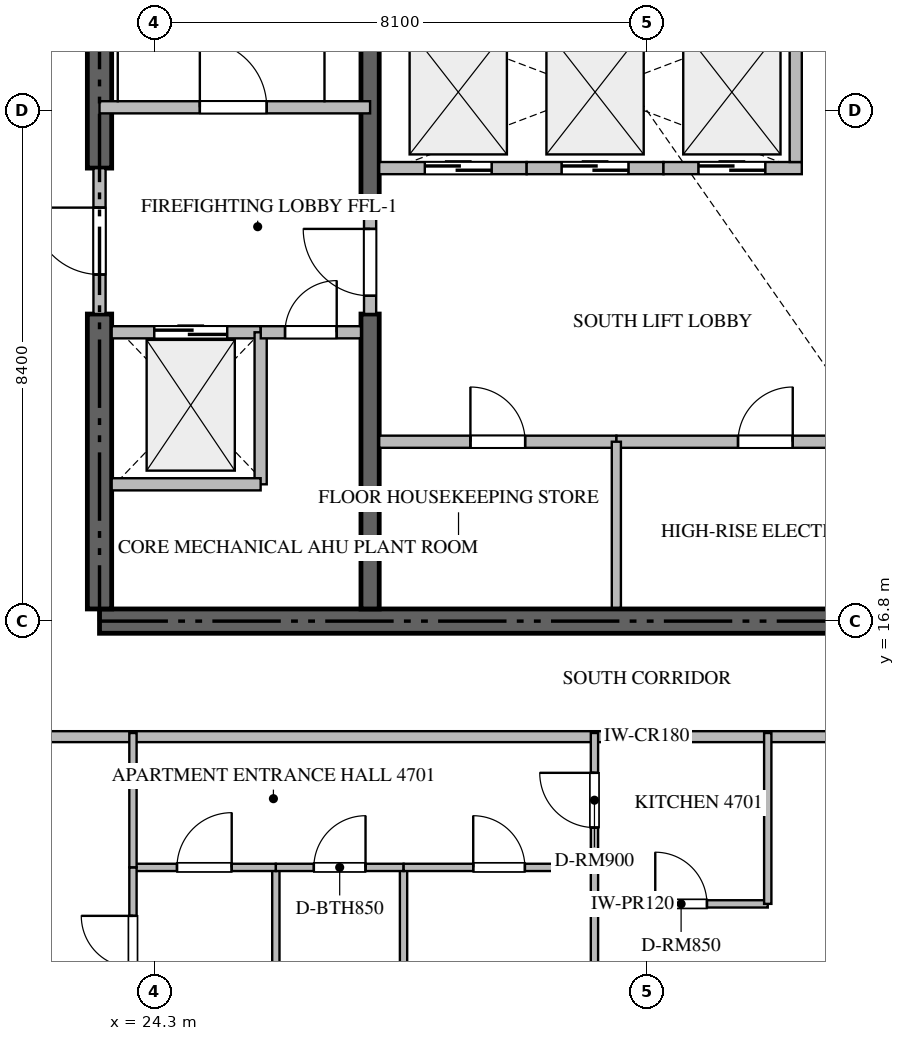
"""IFC4 building model, lengths in metres.
Left out: names, types, materials, properties, quantities, classifications, styles, units other than length and angle.
Written with IfcOpenShell. Run it as: python <this file> out.ifc"""

import sys

from ifc_helpers import new_model, si_unit, direction, frame, frame_2d, origin, place, context, subcontext, project, spatial, rectangle, extrude, source, transform, mapped, element, fill, save


model = new_model("IFC4")
c1 = context("Model", 3, precision=1e-05, world=origin(), true_north=direction((0.0, 1.0)))
c2 = subcontext(c1, "Body", "Model", "MODEL_VIEW")
j1 = project(units=[si_unit("LENGTHUNIT", "METRE"), si_unit("PLANEANGLEUNIT", "RADIAN")], contexts=[c1])
p1 = place(None, origin())
s1 = spatial("IfcSite", under=j1, at=p1, CompositionType="ELEMENT")
p2 = place(p1, origin())
s2 = spatial("IfcBuilding", under=s1, at=p2, CompositionType="ELEMENT")
p3 = place(p2, frame((0.0, 0.0, 187.65)))
s3 = spatial("IfcBuildingStorey", under=s2, at=p3, CompositionType="ELEMENT", Elevation=187.65)
p4 = place(p3, frame((23.4, 16.8, -0.26), z_axis=(0.0, 0.0, 1.0), x_axis=(1.0, 0.0, 0.0)))
e1 = element("IfcWall", 1, at=p4, inside=s3, PredefinedType="SHEAR", context=c2, shape_type="SweptSolid", body=[
    extrude(rectangle(XDim=18.0, YDim=0.4, at=frame_2d((9.0, 0.0))), origin(), (0.0, 0.0, 1.0), 3.748),
])
p5 = place(p3, frame((23.4, 17.0, -0.26), z_axis=(0.0, 0.0, 1.0), x_axis=(0.0, 1.0, 0.0)))
e2 = element("IfcWall", 2, at=p5, inside=s3, PredefinedType="SHEAR", context=c2, shape_type="SweptSolid", body=[
    extrude(rectangle(XDim=4.85, YDim=0.4, at=frame_2d((2.425, 0.0))), origin(), (0.0, 0.0, 1.0), 3.748),
])
p6 = place(p3, frame((23.4, 24.25, -0.26), z_axis=(0.0, 0.0, 1.0), x_axis=(0.0, 1.0, 0.0)))
e3 = element("IfcWall", 3, at=p6, inside=s3, PredefinedType="SHEAR", context=c2, shape_type="SweptSolid", body=[
    extrude(rectangle(XDim=9.15, YDim=0.4, at=frame_2d((4.575, 0.0))), origin(), (0.0, 0.0, 1.0), 3.748),
])
p7 = place(p3, frame((27.85, 17.0, -0.26), z_axis=(0.0, 0.0, 1.0), x_axis=(0.0, 1.0, 0.0)))
e4 = element("IfcWall", 4, at=p7, inside=s3, PredefinedType="SHEAR", context=c2, shape_type="SweptSolid", body=[
    extrude(rectangle(XDim=4.85, YDim=0.3, at=frame_2d((2.425, 0.0))), origin(), (0.0, 0.0, 1.0), 3.748),
])
p8 = place(p3, frame((27.85, 23.55, -0.26), z_axis=(0.0, 0.0, 1.0), x_axis=(0.0, 1.0, 0.0)))
e5 = element("IfcWall", 5, at=p8, inside=s3, PredefinedType="SHEAR", context=c2, shape_type="SweptSolid", body=[
    extrude(rectangle(XDim=9.85, YDim=0.3, at=frame_2d((4.925, 0.0))), origin(), (0.0, 0.0, 1.0), 3.748),
])
p9 = place(p3, frame((23.4, 25.25, 0.0), z_axis=(0.0, 0.0, 1.0), x_axis=(1.0, 0.0, 0.0)))
e6 = element("IfcWall", 6, at=p9, inside=s3, PredefinedType="STANDARD", context=c2, shape_type="SweptSolid", body=[
    extrude(rectangle(XDim=4.45, YDim=0.2, at=frame_2d((2.225, 0.0))), origin(), (0.0, 0.0, 1.0), 3.49),
])
p10 = place(p9, frame((1.65, 0.0, 0.0)))
e7 = element("IfcOpeningElement", 7, at=p10, cuts=e6, PredefinedType="OPENING", context=c2, shape_type="SweptSolid", body=[
    extrude(rectangle(XDim=1.1, YDim=2.15, at=frame_2d((0.55, 1.075))), frame((0.0, 0.11, 0.0), z_axis=(0.0, -1.0, 0.0), x_axis=(1.0, 0.0, 0.0)), (0.0, 0.0, 1.0), 0.22),
])
p11 = place(p3, frame((23.6, 21.55, 0.0), z_axis=(0.0, 0.0, 1.0), x_axis=(1.0, 0.0, 0.0)))
e8 = element("IfcWall", 8, at=p11, inside=s3, PredefinedType="STANDARD", context=c2, shape_type="SweptSolid", body=[
    extrude(rectangle(XDim=2.45, YDim=0.2, at=frame_2d((1.225, 0.0))), origin(), (0.0, 0.0, 1.0), 3.49),
])
p12 = place(p11, frame((0.7, 0.0, 0.0)))
e9 = element("IfcOpeningElement", 9, at=p12, cuts=e8, PredefinedType="OPENING", context=c2, shape_type="SweptSolid", body=[
    extrude(rectangle(XDim=1.2, YDim=2.2, at=frame_2d((0.6, 1.1))), frame((0.0, 0.11, 0.0), z_axis=(0.0, -1.0, 0.0), x_axis=(1.0, 0.0, 0.0)), (0.0, 0.0, 1.0), 0.22),
])
p13 = place(p3, frame((28.0, 24.25, 0.0), z_axis=(0.0, 0.0, 1.0), x_axis=(1.0, 0.0, 0.0)))
e10 = element("IfcWall", 10, at=p13, inside=s3, PredefinedType="STANDARD", context=c2, shape_type="SweptSolid", body=[
    extrude(rectangle(XDim=2.425, YDim=0.2, at=frame_2d((1.212, 0.0))), origin(), (0.0, 0.0, 1.0), 3.49),
])
p14 = place(p13, frame((0.75, 0.0, 0.0)))
e11 = element("IfcOpeningElement", 11, at=p14, cuts=e10, PredefinedType="OPENING", context=c2, shape_type="SweptSolid", body=[
    extrude(rectangle(XDim=1.1, YDim=2.2, at=frame_2d((0.55, 1.1))), frame((0.0, 0.11, 0.0), z_axis=(0.0, -1.0, 0.0), x_axis=(1.0, 0.0, 0.0)), (0.0, 0.0, 1.0), 0.22),
])
p15 = place(p3, frame((30.425, 24.25, 0.0), z_axis=(0.0, 0.0, 1.0), x_axis=(1.0, 0.0, 0.0)))
e12 = element("IfcWall", 12, at=p15, inside=s3, PredefinedType="STANDARD", context=c2, shape_type="SweptSolid", body=[
    extrude(rectangle(XDim=2.25, YDim=0.2, at=frame_2d((1.125, 0.0))), origin(), (0.0, 0.0, 1.0), 3.49),
])
p16 = place(p15, frame((0.575, 0.0, 0.0)))
e13 = element("IfcOpeningElement", 13, at=p16, cuts=e12, PredefinedType="OPENING", context=c2, shape_type="SweptSolid", body=[
    extrude(rectangle(XDim=1.1, YDim=2.2, at=frame_2d((0.55, 1.1))), frame((0.0, 0.11, 0.0), z_axis=(0.0, -1.0, 0.0), x_axis=(1.0, 0.0, 0.0)), (0.0, 0.0, 1.0), 0.22),
])
p17 = place(p3, frame((32.675, 24.25, 0.0), z_axis=(0.0, 0.0, 1.0), x_axis=(1.0, 0.0, 0.0)))
e14 = element("IfcWall", 14, at=p17, inside=s3, PredefinedType="STANDARD", context=c2, shape_type="SweptSolid", body=[
    extrude(rectangle(XDim=2.275, YDim=0.2, at=frame_2d((1.137, 0.0))), origin(), (0.0, 0.0, 1.0), 3.49),
])
p18 = place(p17, frame((0.575, 0.0, 0.0)))
e15 = element("IfcOpeningElement", 15, at=p18, cuts=e14, PredefinedType="OPENING", context=c2, shape_type="SweptSolid", body=[
    extrude(rectangle(XDim=1.1, YDim=2.2, at=frame_2d((0.55, 1.1))), frame((0.0, 0.11, 0.0), z_axis=(0.0, -1.0, 0.0), x_axis=(1.0, 0.0, 0.0)), (0.0, 0.0, 1.0), 0.22),
])
for number, where, z_axis, x_axis in (
    (16, (34.85, 24.35, 0.0), (0.0, 0.0, 1.0), (0.0, 1.0, 0.0)),
    (17, (26.05, 19.05, 0.0), (0.0, 0.0, 1.0), (0.0, 1.0, 0.0)),
):
    element("IfcWall", number, at=place(p3, frame(where, z_axis=z_axis, x_axis=x_axis)), inside=s3, PredefinedType="STANDARD", context=c2, shape_type="SweptSolid", body=[
        extrude(rectangle(XDim=2.5, YDim=0.2, at=frame_2d((1.25, 0.0))), origin(), (0.0, 0.0, 1.0), 3.49),
    ])
p19 = place(p3, frame((23.6, 19.05, 0.0), z_axis=(0.0, 0.0, 1.0), x_axis=(1.0, 0.0, 0.0)))
e18 = element("IfcWall", 18, at=p19, inside=s3, PredefinedType="STANDARD", context=c2, shape_type="SweptSolid", body=[
    extrude(rectangle(XDim=2.45, YDim=0.2, at=frame_2d((1.225, 0.0))), origin(), (0.0, 0.0, 1.0), 3.49),
])
p20 = place(p3, frame((26.052, 21.55, 0.0), z_axis=(0.0, 0.0, 1.0), x_axis=(1.0, 0.0, 0.0)))
e19 = element("IfcWall", 19, at=p20, inside=s3, PredefinedType="STANDARD", context=c2, shape_type="SweptSolid", body=[
    extrude(rectangle(XDim=1.648, YDim=0.2, at=frame_2d((0.824, 0.0))), origin(), (0.0, 0.0, 1.0), 3.49),
])
p21 = place(p20, frame((0.399, 0.0, 0.0)))
e20 = element("IfcOpeningElement", 20, at=p21, cuts=e19, PredefinedType="OPENING", context=c2, shape_type="SweptSolid", body=[
    extrude(rectangle(XDim=0.85, YDim=2.1, at=frame_2d((0.425, 1.05))), frame((0.0, 0.11, 0.0), z_axis=(0.0, -1.0, 0.0), x_axis=(1.0, 0.0, 0.0)), (0.0, 0.0, 1.0), 0.22),
])
p22 = place(p3, frame((23.4, 21.852, 0.0), z_axis=(0.0, 0.0, 1.0), x_axis=(0.0, 1.0, 0.0)))
e21 = element("IfcWall", 21, at=p22, inside=s3, PredefinedType="STANDARD", context=c2, shape_type="SweptSolid", body=[
    extrude(rectangle(XDim=2.396, YDim=0.2, at=frame_2d((1.198, 0.0))), origin(), (0.0, 0.0, 1.0), 3.49),
])
p23 = place(p22, frame((0.648, 0.0, 0.0)))
e22 = element("IfcOpeningElement", 22, at=p23, cuts=e21, PredefinedType="OPENING", context=c2, shape_type="SweptSolid", body=[
    extrude(rectangle(XDim=1.1, YDim=2.15, at=frame_2d((0.55, 1.075))), frame((0.0, 0.11, 0.0), z_axis=(0.0, -1.0, 0.0), x_axis=(1.0, 0.0, 0.0)), (0.0, 0.0, 1.0), 0.22),
])
p24 = place(p3, frame((27.85, 21.852, 0.0), z_axis=(0.0, 0.0, 1.0), x_axis=(0.0, 1.0, 0.0)))
e23 = element("IfcWall", 23, at=p24, inside=s3, PredefinedType="STANDARD", context=c2, shape_type="SweptSolid", body=[
    extrude(rectangle(XDim=1.696, YDim=0.2, at=frame_2d((0.848, 0.0))), origin(), (0.0, 0.0, 1.0), 3.49),
])
p25 = place(p24, frame((0.298, 0.0, 0.0)))
e24 = element("IfcOpeningElement", 24, at=p25, cuts=e23, PredefinedType="OPENING", context=c2, shape_type="SweptSolid", body=[
    extrude(rectangle(XDim=1.1, YDim=2.15, at=frame_2d((0.55, 1.075))), frame((0.0, 0.11, 0.0), z_axis=(0.0, -1.0, 0.0), x_axis=(1.0, 0.0, 0.0)), (0.0, 0.0, 1.0), 0.22),
])
p26 = place(p3, frame((28.0, 19.75, 0.0), z_axis=(0.0, 0.0, 1.0), x_axis=(1.0, 0.0, 0.0)))
e25 = element("IfcWall", 25, at=p26, inside=s3, PredefinedType="STANDARD", context=c2, shape_type="SweptSolid", body=[
    extrude(rectangle(XDim=3.9, YDim=0.2, at=frame_2d((1.95, 0.0))), origin(), (0.0, 0.0, 1.0), 3.49),
])
p27 = place(p26, frame((1.5, 0.0, 0.0)))
e26 = element("IfcOpeningElement", 26, at=p27, cuts=e25, PredefinedType="OPENING", context=c2, shape_type="SweptSolid", body=[
    extrude(rectangle(XDim=0.9, YDim=2.1, at=frame_2d((0.45, 1.05))), frame((0.0, 0.11, 0.0), z_axis=(0.0, -1.0, 0.0), x_axis=(1.0, 0.0, 0.0)), (0.0, 0.0, 1.0), 0.22),
])
p28 = place(p3, frame((31.902, 19.75, 0.0), z_axis=(0.0, 0.0, 1.0), x_axis=(1.0, 0.0, 0.0)))
e27 = element("IfcWall", 27, at=p28, inside=s3, PredefinedType="STANDARD", context=c2, shape_type="SweptSolid", body=[
    extrude(rectangle(XDim=4.898, YDim=0.2, at=frame_2d((2.449, 0.0))), origin(), (0.0, 0.0, 1.0), 3.49),
])
p29 = place(p28, frame((1.999, 0.0, 0.0)))
e28 = element("IfcOpeningElement", 28, at=p29, cuts=e27, PredefinedType="OPENING", context=c2, shape_type="SweptSolid", body=[
    extrude(rectangle(XDim=0.9, YDim=2.1, at=frame_2d((0.45, 1.05))), frame((0.0, 0.11, 0.0), z_axis=(0.0, -1.0, 0.0), x_axis=(1.0, 0.0, 0.0)), (0.0, 0.0, 1.0), 0.22),
])
p30 = place(p3, frame((31.9, 17.02, 0.0), z_axis=(0.0, 0.0, 1.0), x_axis=(0.0, 1.0, 0.0)))
e29 = element("IfcWall", 29, at=p30, inside=s3, PredefinedType="PARTITIONING", context=c2, shape_type="SweptSolid", body=[
    extrude(rectangle(XDim=2.73, YDim=0.15, at=frame_2d((1.365, 0.0))), origin(), (0.0, 0.0, 1.0), 3.49),
])
p31 = place(p3, frame((20.952, 14.9, 0.0), z_axis=(0.0, 0.0, 1.0), x_axis=(1.0, 0.0, 0.0)))
e30 = element("IfcWall", 30, at=p31, inside=s3, PredefinedType="PARTITIONING", context=c2, shape_type="SweptSolid", body=[
    extrude(rectangle(XDim=22.896, YDim=0.18, at=frame_2d((11.448, 0.0))), origin(), (0.0, 0.0, 1.0), 3.49),
])
p32 = place(p31, frame((15.809, 0.0, 0.0)))
e31 = element("IfcOpeningElement", 31, at=p32, cuts=e30, PredefinedType="OPENING", context=c2, shape_type="SweptSolid", body=[
    extrude(rectangle(XDim=1.0, YDim=2.15, at=frame_2d((0.5, 1.075))), frame((0.0, 0.1, 0.0), z_axis=(0.0, -1.0, 0.0), x_axis=(1.0, 0.0, 0.0)), (0.0, 0.0, 1.0), 0.2),
])
p33 = place(p3, frame((31.54, 12.15, 0.0), z_axis=(0.0, 0.0, 1.0), x_axis=(1.0, 0.0, 0.0)))
e32 = element("IfcWall", 32, at=p33, inside=s3, PredefinedType="PARTITIONING", context=c2, shape_type="SweptSolid", body=[
    extrude(rectangle(XDim=2.85, YDim=0.12, at=frame_2d((1.425, 0.0))), origin(), (0.0, 0.0, 1.0), 3.49),
])
p34 = place(p33, frame((1.0, 0.0, 0.0)))
e33 = element("IfcOpeningElement", 33, at=p34, cuts=e32, PredefinedType="OPENING", context=c2, shape_type="SweptSolid", body=[
    extrude(rectangle(XDim=0.85, YDim=2.1, at=frame_2d((0.425, 1.05))), frame((0.0, 0.07, 0.0), z_axis=(0.0, -1.0, 0.0), x_axis=(1.0, 0.0, 0.0)), (0.0, 0.0, 1.0), 0.14),
])
p35 = place(p3, frame((34.39, 12.15, 0.0), z_axis=(0.0, 0.0, 1.0), x_axis=(0.0, 1.0, 0.0)))
e34 = element("IfcWall", 34, at=p35, inside=s3, PredefinedType="PARTITIONING", context=c2, shape_type="SweptSolid", body=[
    extrude(rectangle(XDim=2.81, YDim=0.12, at=frame_2d((1.405, 0.0))), origin(), (0.0, 0.0, 1.0), 3.49),
])
p36 = place(p3, frame((31.54, 12.75, 0.0), z_axis=(0.0, 0.0, 1.0), x_axis=(0.0, 1.0, 0.0)))
e35 = element("IfcWall", 35, at=p36, inside=s3, PredefinedType="PARTITIONING", context=c2, shape_type="SweptSolid", body=[
    extrude(rectangle(XDim=2.21, YDim=0.12, at=frame_2d((1.105, 0.0))), origin(), (0.0, 0.0, 1.0), 3.49),
])
p37 = place(p36, frame((0.655, 0.0, 0.0)))
e36 = element("IfcOpeningElement", 36, at=p37, cuts=e35, PredefinedType="OPENING", context=c2, shape_type="SweptSolid", body=[
    extrude(rectangle(XDim=0.9, YDim=2.1, at=frame_2d((0.45, 1.05))), frame((0.0, 0.07, 0.0), z_axis=(0.0, -1.0, 0.0), x_axis=(1.0, 0.0, 0.0)), (0.0, 0.0, 1.0), 0.14),
])
p38 = place(p3, frame((31.54, 7.947, 0.0), z_axis=(0.0, 0.0, 1.0), x_axis=(0.0, 1.0, 0.0)))
e37 = element("IfcWall", 37, at=p38, inside=s3, PredefinedType="PARTITIONING", context=c2, shape_type="SweptSolid", body=[
    extrude(rectangle(XDim=4.801, YDim=0.12, at=frame_2d((2.4, 0.0))), origin(), (0.0, 0.0, 1.0), 3.49),
])
p39 = place(p3, frame((26.3, 1.495, 0.0), z_axis=(0.0, 0.0, 1.0), x_axis=(0.0, 1.0, 0.0)))
e38 = element("IfcWall", 38, at=p39, inside=s3, PredefinedType="PARTITIONING", context=c2, shape_type="SweptSolid", body=[
    extrude(rectangle(XDim=11.255, YDim=0.12, at=frame_2d((5.627, 0.0))), origin(), (0.0, 0.0, 1.0), 3.49),
])
p40 = place(p3, frame((28.4, 7.945, 0.0), z_axis=(0.0, 0.0, 1.0), x_axis=(0.0, 1.0, 0.0)))
e39 = element("IfcWall", 39, at=p40, inside=s3, PredefinedType="PARTITIONING", context=c2, shape_type="SweptSolid", body=[
    extrude(rectangle(XDim=4.805, YDim=0.12, at=frame_2d((2.402, 0.0))), origin(), (0.0, 0.0, 1.0), 3.49),
])
p41 = place(p3, frame((26.3, 12.75, 0.0), z_axis=(0.0, 0.0, 1.0), x_axis=(1.0, 0.0, 0.0)))
e40 = element("IfcWall", 40, at=p41, inside=s3, PredefinedType="PARTITIONING", context=c2, shape_type="SweptSolid", body=[
    extrude(rectangle(XDim=2.1, YDim=0.12, at=frame_2d((1.05, 0.0))), origin(), (0.0, 0.0, 1.0), 3.49),
])
p42 = place(p41, frame((0.625, 0.0, 0.0)))
e41 = element("IfcOpeningElement", 41, at=p42, cuts=e40, PredefinedType="OPENING", context=c2, shape_type="SweptSolid", body=[
    extrude(rectangle(XDim=0.85, YDim=2.1, at=frame_2d((0.425, 1.05))), frame((0.0, 0.07, 0.0), z_axis=(0.0, -1.0, 0.0), x_axis=(1.0, 0.0, 0.0)), (0.0, 0.0, 1.0), 0.14),
])
p43 = place(p3, frame((28.402, 12.75, 0.0), z_axis=(0.0, 0.0, 1.0), x_axis=(1.0, 0.0, 0.0)))
e42 = element("IfcWall", 42, at=p43, inside=s3, PredefinedType="PARTITIONING", context=c2, shape_type="SweptSolid", body=[
    extrude(rectangle(XDim=3.138, YDim=0.12, at=frame_2d((1.569, 0.0))), origin(), (0.0, 0.0, 1.0), 3.49),
])
p44 = place(p43, frame((1.144, 0.0, 0.0)))
e43 = element("IfcOpeningElement", 43, at=p44, cuts=e42, PredefinedType="OPENING", context=c2, shape_type="SweptSolid", body=[
    extrude(rectangle(XDim=0.85, YDim=2.1, at=frame_2d((0.425, 1.05))), frame((0.0, 0.07, 0.0), z_axis=(0.0, -1.0, 0.0), x_axis=(1.0, 0.0, 0.0)), (0.0, 0.0, 1.0), 0.14),
])
p45 = place(p3, frame((23.95, 12.75, 0.0), z_axis=(0.0, 0.0, 1.0), x_axis=(1.0, 0.0, 0.0)))
e44 = element("IfcWall", 44, at=p45, inside=s3, PredefinedType="PARTITIONING", context=c2, shape_type="SweptSolid", body=[
    extrude(rectangle(XDim=2.348, YDim=0.12, at=frame_2d((1.174, 0.0))), origin(), (0.0, 0.0, 1.0), 3.49),
])
p46 = place(p45, frame((0.724, 0.0, 0.0)))
e45 = element("IfcOpeningElement", 45, at=p46, cuts=e44, PredefinedType="OPENING", context=c2, shape_type="SweptSolid", body=[
    extrude(rectangle(XDim=0.9, YDim=2.1, at=frame_2d((0.45, 1.05))), frame((0.0, 0.07, 0.0), z_axis=(0.0, -1.0, 0.0), x_axis=(1.0, 0.0, 0.0)), (0.0, 0.0, 1.0), 0.14),
])
p47 = place(p3, frame((23.95, 10.305, 0.0), z_axis=(0.0, 0.0, 1.0), x_axis=(0.0, 1.0, 0.0)))
e46 = element("IfcWall", 46, at=p47, inside=s3, PredefinedType="PARTITIONING", context=c2, shape_type="SweptSolid", body=[
    extrude(rectangle(XDim=2.445, YDim=0.12, at=frame_2d((1.223, 0.0))), origin(), (0.0, 0.0, 1.0), 3.49),
])
p48 = place(p47, frame((0.798, 0.0, 0.0)))
e47 = element("IfcOpeningElement", 47, at=p48, cuts=e46, PredefinedType="OPENING", context=c2, shape_type="SweptSolid", body=[
    extrude(rectangle(XDim=0.85, YDim=2.1, at=frame_2d((0.425, 1.05))), frame((0.0, 0.07, 0.0), z_axis=(0.0, -1.0, 0.0), x_axis=(1.0, 0.0, 0.0)), (0.0, 0.0, 1.0), 0.14),
])
p49 = place(p3, frame((23.95, 12.752, 0.0), z_axis=(0.0, 0.0, 1.0), x_axis=(0.0, 1.0, 0.0)))
e48 = element("IfcWall", 48, at=p49, inside=s3, PredefinedType="PARTITIONING", context=c2, shape_type="SweptSolid", body=[
    extrude(rectangle(XDim=2.208, YDim=0.12, at=frame_2d((1.104, 0.0))), origin(), (0.0, 0.0, 1.0), 3.49),
])
m1 = source(origin(), c2, "Body", "SweptSolid", [
    extrude(rectangle(XDim=1.1, YDim=2.15, at=frame_2d((0.55, 1.075))), frame((0.0, 0.025, 0.0), z_axis=(0.0, -1.0, 0.0), x_axis=(1.0, 0.0, 0.0)), (0.0, 0.0, 1.0), 0.05),
])
p50 = place(p10, origin())
e49 = element("IfcDoor", 49, at=p50, inside=s3, OperationType="SINGLE_SWING_LEFT", PredefinedType="DOOR", context=c2, shape_type="MappedRepresentation", body=[
    mapped(m1, transform((0.0, 0.0, 0.0), scale=1.0)),
])
fill(e7, e49)
m2 = source(origin(), c2, "Body", "SweptSolid", [
    extrude(rectangle(XDim=1.2, YDim=2.2, at=frame_2d((0.6, 1.1))), frame((0.0, 0.025, 0.0), z_axis=(0.0, -1.0, 0.0), x_axis=(1.0, 0.0, 0.0)), (0.0, 0.0, 1.0), 0.05),
])
p51 = place(p12, origin())
e50 = element("IfcDoor", 50, at=p51, inside=s3, OperationType="DOUBLE_DOOR_SLIDING", PredefinedType="DOOR", context=c2, shape_type="MappedRepresentation", body=[
    mapped(m2, transform((0.0, 0.0, 0.0), scale=1.0)),
])
fill(e9, e50)
m3 = source(origin(), c2, "Body", "SweptSolid", [
    extrude(rectangle(XDim=1.1, YDim=2.2, at=frame_2d((0.55, 1.1))), frame((0.0, 0.025, 0.0), z_axis=(0.0, -1.0, 0.0), x_axis=(1.0, 0.0, 0.0)), (0.0, 0.0, 1.0), 0.05),
])
p52 = place(p14, origin())
e51 = element("IfcDoor", 51, at=p52, inside=s3, OperationType="DOUBLE_DOOR_SLIDING", PredefinedType="DOOR", context=c2, shape_type="MappedRepresentation", body=[
    mapped(m3, transform((0.0, 0.0, 0.0), scale=1.0)),
])
fill(e11, e51)
p53 = place(p16, origin())
e52 = element("IfcDoor", 52, at=p53, inside=s3, OperationType="DOUBLE_DOOR_SLIDING", PredefinedType="DOOR", context=c2, shape_type="MappedRepresentation", body=[
    mapped(m3, transform((0.0, 0.0, 0.0), scale=1.0)),
])
fill(e13, e52)
p54 = place(p18, origin())
e53 = element("IfcDoor", 53, at=p54, inside=s3, OperationType="DOUBLE_DOOR_SLIDING", PredefinedType="DOOR", context=c2, shape_type="MappedRepresentation", body=[
    mapped(m3, transform((0.0, 0.0, 0.0), scale=1.0)),
])
fill(e15, e53)
m4 = source(origin(), c2, "Body", "SweptSolid", [
    extrude(rectangle(XDim=0.85, YDim=2.1, at=frame_2d((0.425, 1.05))), frame((0.0, 0.025, 0.0), z_axis=(0.0, -1.0, 0.0), x_axis=(1.0, 0.0, 0.0)), (0.0, 0.0, 1.0), 0.05),
])
p55 = place(p21, origin())
e54 = element("IfcDoor", 54, at=p55, inside=s3, OperationType="SINGLE_SWING_RIGHT", PredefinedType="DOOR", context=c2, shape_type="MappedRepresentation", body=[
    mapped(m4, transform((0.0, 0.0, 0.0), scale=1.0)),
])
fill(e20, e54)
p56 = place(p23, origin())
e55 = element("IfcDoor", 55, at=p56, inside=s3, OperationType="SINGLE_SWING_RIGHT", PredefinedType="DOOR", context=c2, shape_type="MappedRepresentation", body=[
    mapped(m1, transform((0.0, 0.0, 0.0), scale=1.0)),
])
fill(e22, e55)
p57 = place(p25, origin())
e56 = element("IfcDoor", 56, at=p57, inside=s3, OperationType="SINGLE_SWING_RIGHT", PredefinedType="DOOR", context=c2, shape_type="MappedRepresentation", body=[
    mapped(m1, transform((0.0, 0.0, 0.0), scale=1.0)),
])
fill(e24, e56)
m5 = source(origin(), c2, "Body", "SweptSolid", [
    extrude(rectangle(XDim=0.9, YDim=2.1, at=frame_2d((0.45, 1.05))), frame((0.0, 0.025, 0.0), z_axis=(0.0, -1.0, 0.0), x_axis=(1.0, 0.0, 0.0)), (0.0, 0.0, 1.0), 0.05),
])
p58 = place(p27, origin())
e57 = element("IfcDoor", 57, at=p58, inside=s3, OperationType="SINGLE_SWING_LEFT", PredefinedType="DOOR", context=c2, shape_type="MappedRepresentation", body=[
    mapped(m5, transform((0.0, 0.0, 0.0), scale=1.0)),
])
fill(e26, e57)
p59 = place(p29, origin())
e58 = element("IfcDoor", 58, at=p59, inside=s3, OperationType="SINGLE_SWING_RIGHT", PredefinedType="DOOR", context=c2, shape_type="MappedRepresentation", body=[
    mapped(m5, transform((0.0, 0.0, 0.0), scale=1.0)),
])
fill(e28, e58)
p60 = place(p34, origin())
e59 = element("IfcDoor", 59, at=p60, inside=s3, OperationType="SINGLE_SWING_LEFT", PredefinedType="DOOR", context=c2, shape_type="MappedRepresentation", body=[
    mapped(m4, transform((0.0, 0.0, 0.0), scale=1.0)),
])
fill(e33, e59)
p61 = place(p37, origin())
e60 = element("IfcDoor", 60, at=p61, inside=s3, OperationType="SINGLE_SWING_RIGHT", PredefinedType="DOOR", context=c2, shape_type="MappedRepresentation", body=[
    mapped(m5, transform((0.0, 0.0, 0.0), scale=1.0)),
])
fill(e36, e60)
p62 = place(p42, origin())
e61 = element("IfcDoor", 61, at=p62, inside=s3, OperationType="SINGLE_SWING_RIGHT", PredefinedType="DOOR", context=c2, shape_type="MappedRepresentation", body=[
    mapped(m4, transform((0.0, 0.0, 0.0), scale=1.0)),
])
fill(e41, e61)
p63 = place(p44, origin())
e62 = element("IfcDoor", 62, at=p63, inside=s3, OperationType="SINGLE_SWING_LEFT", PredefinedType="DOOR", context=c2, shape_type="MappedRepresentation", body=[
    mapped(m4, transform((0.0, 0.0, 0.0), scale=1.0)),
])
fill(e43, e62)
p64 = place(p46, origin())
e63 = element("IfcDoor", 63, at=p64, inside=s3, OperationType="SINGLE_SWING_RIGHT", PredefinedType="DOOR", context=c2, shape_type="MappedRepresentation", body=[
    mapped(m5, transform((0.0, 0.0, 0.0), scale=1.0)),
])
fill(e45, e63)
p65 = place(p48, origin())
e64 = element("IfcDoor", 64, at=p65, inside=s3, OperationType="SINGLE_SWING_RIGHT", PredefinedType="DOOR", context=c2, shape_type="MappedRepresentation", body=[
    mapped(m4, transform((0.0, 0.0, 0.0), scale=1.0)),
])
fill(e47, e64)
save(model, sys.argv[1])
